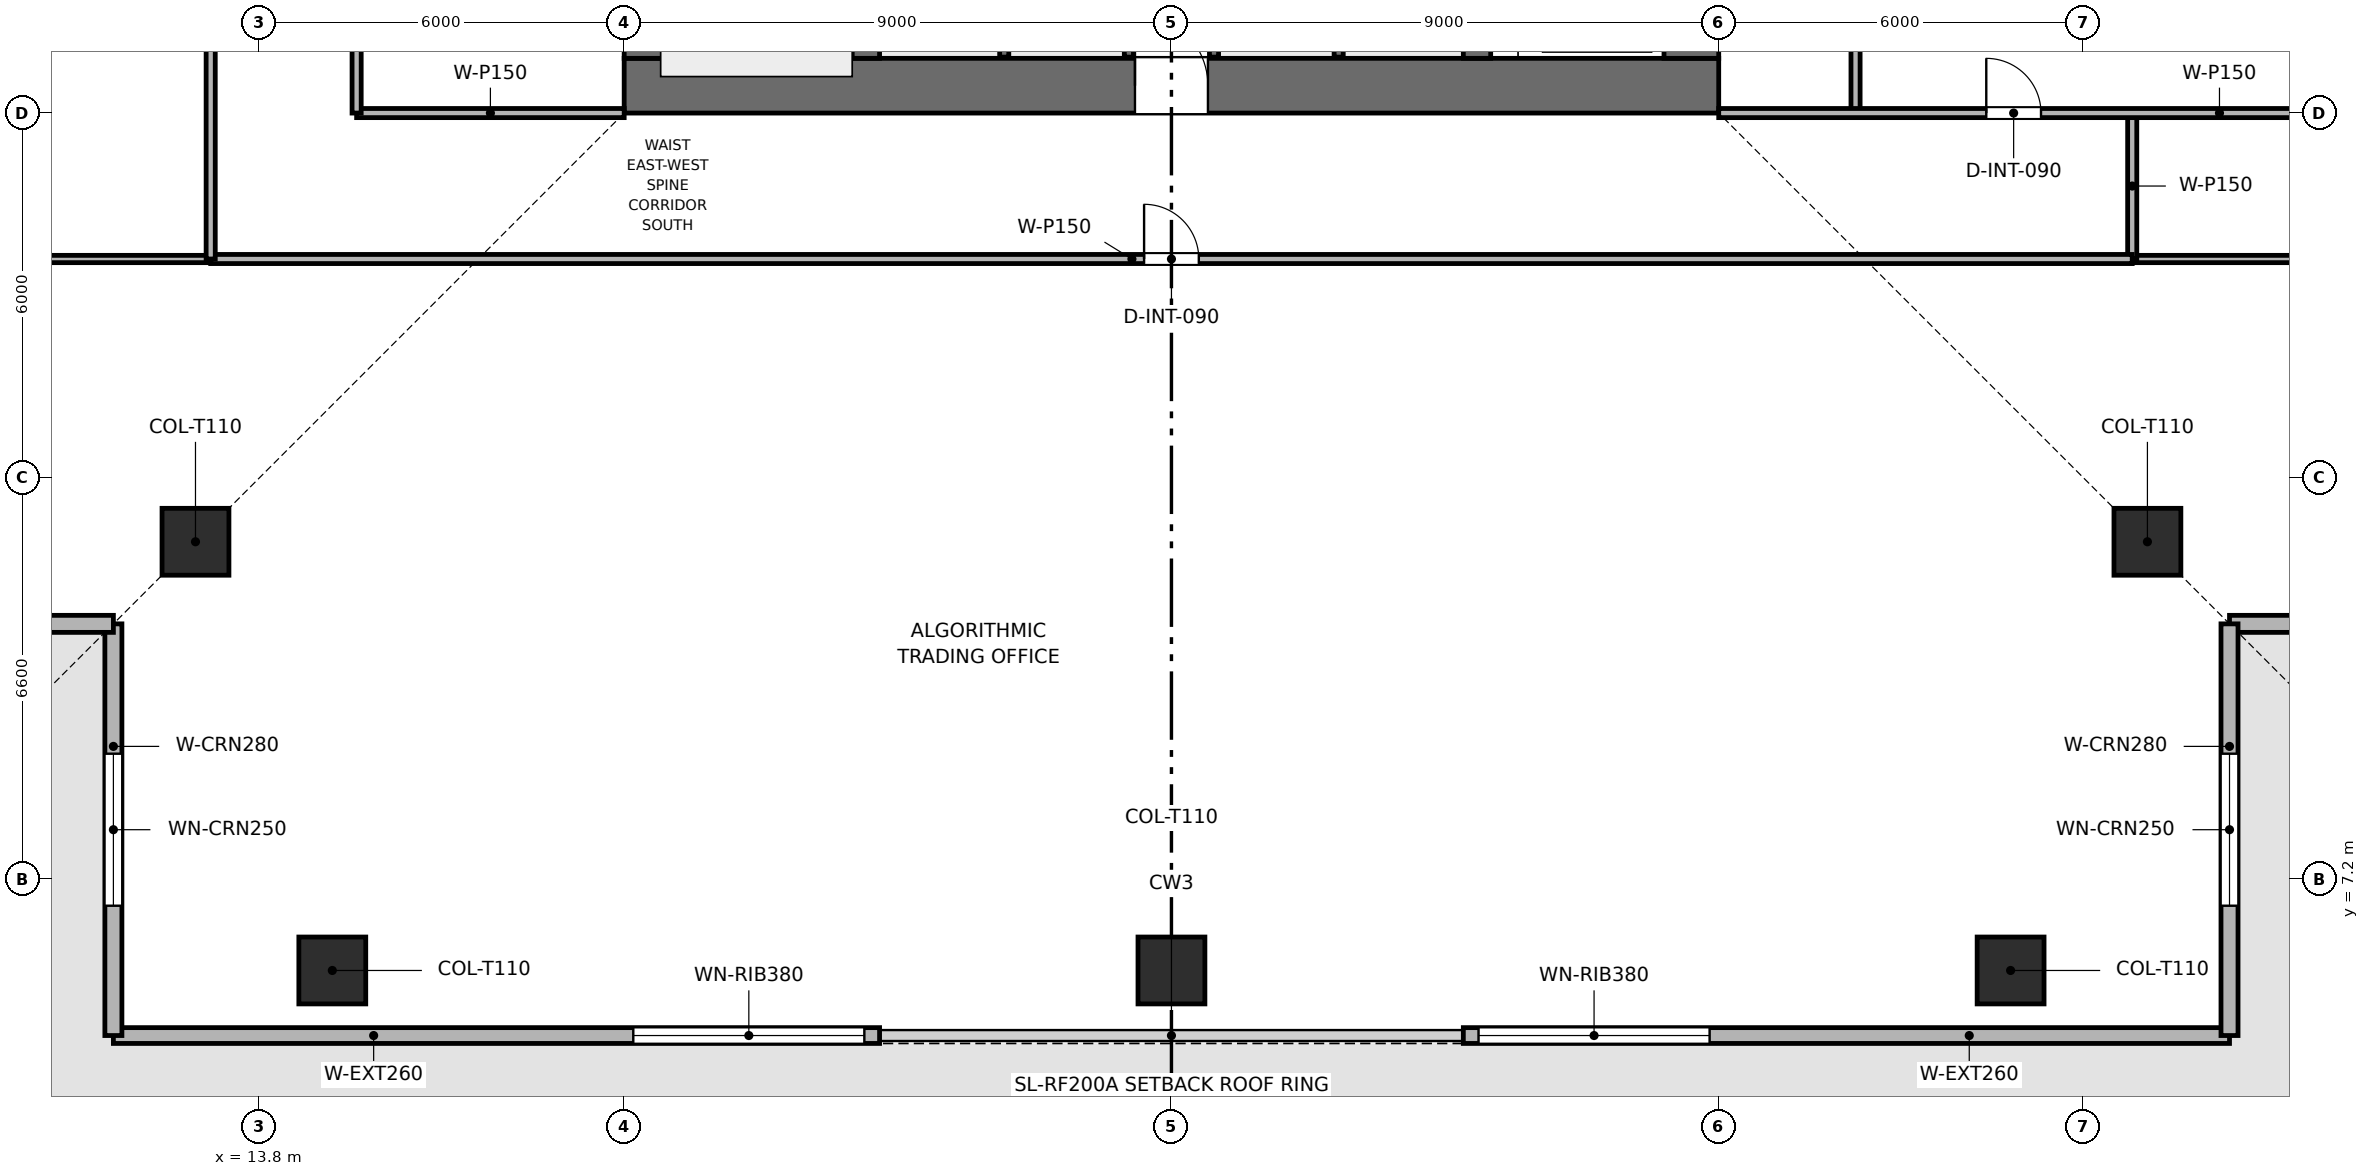
"""IFC4 building model, lengths in metres.
Left out: names, types, materials, properties, quantities, classifications, styles, units other than length and angle.
Written with IfcOpenShell. Run it as: python <this file> out.ifc"""

import sys

from ifc_helpers import new_model, si_unit, direction, frame, frame_2d, origin, origin_2d, place, context, subcontext, project, spatial, rectangle, extrude, element, fill, save


model = new_model("IFC4")
c1 = context("Model", 3, precision=1e-05, world=origin(), true_north=direction((0.0, 1.0)))
c2 = subcontext(c1, "Body", "Model", "MODEL_VIEW")
j1 = project(units=[si_unit("LENGTHUNIT", "METRE"), si_unit("PLANEANGLEUNIT", "RADIAN")], contexts=[c1])
p1 = place(None, origin())
s1 = spatial("IfcSite", under=j1, at=p1, CompositionType="ELEMENT")
p2 = place(p1, origin())
s2 = spatial("IfcBuilding", under=s1, at=p2, CompositionType="ELEMENT")
p3 = place(p2, frame((0.0, 0.0, 138.3)))
s3 = spatial("IfcBuildingStorey", under=s2, at=p3, CompositionType="ELEMENT", Elevation=138.3)
p4 = place(p3, frame((19.8, 20.25, 0.0), z_axis=(0.0, 0.0, 1.0), x_axis=(1.0, 0.0, 0.0)))
e1 = element("IfcWall", 1, at=p4, inside=s3, PredefinedType="SHEAR", context=c2, shape_type="SweptSolid", body=[
    extrude(rectangle(XDim=18.0, YDim=0.9, at=frame_2d((9.0, 0.0))), origin(), (0.0, 0.0, 1.0), 3.75),
])
p5 = place(p4, frame((8.4, 0.0, 0.0)))
e2 = element("IfcOpeningElement", 2, at=p5, cuts=e1, PredefinedType="OPENING", context=c2, shape_type="SweptSolid", body=[
    extrude(rectangle(XDim=1.2, YDim=2.2, at=frame_2d((0.6, 1.1))), frame((0.0, 0.46, 0.0), z_axis=(0.0, -1.0, 0.0), x_axis=(1.0, 0.0, 0.0)), (0.0, 0.0, 1.0), 0.92),
])
p6 = place(p3, frame((20.25, 20.7, 0.0), z_axis=(0.0, 0.0, 1.0), x_axis=(0.0, 1.0, 0.0)))
e3 = element("IfcWall", 3, at=p6, inside=s3, PredefinedType="SHEAR", context=c2, shape_type="SweptSolid", body=[
    extrude(rectangle(XDim=16.2, YDim=0.9, at=frame_2d((8.1, 0.0))), origin(), (0.0, 0.0, 1.0), 3.75),
])
p7 = place(p6, frame((10.1, 0.0, 0.0)))
e4 = element("IfcOpeningElement", 4, at=p7, cuts=e3, PredefinedType="OPENING", context=c2, shape_type="SweptSolid", body=[
    extrude(rectangle(XDim=1.1, YDim=2.15, at=frame_2d((0.55, 1.075))), frame((0.0, 0.46, 0.0), z_axis=(0.0, -1.0, 0.0), x_axis=(1.0, 0.0, 0.0)), (0.0, 0.0, 1.0), 0.92),
])
p8 = place(p3, frame((37.35, 20.7, 0.0), z_axis=(0.0, 0.0, 1.0), x_axis=(0.0, 1.0, 0.0)))
e5 = element("IfcWall", 5, at=p8, inside=s3, PredefinedType="SHEAR", context=c2, shape_type="SweptSolid", body=[
    extrude(rectangle(XDim=16.2, YDim=0.9, at=frame_2d((8.1, 0.0))), origin(), (0.0, 0.0, 1.0), 3.75),
])
p9 = place(p8, frame((4.6, 0.0, 0.0)))
e6 = element("IfcOpeningElement", 6, at=p9, cuts=e5, PredefinedType="OPENING", context=c2, shape_type="SweptSolid", body=[
    extrude(rectangle(XDim=1.1, YDim=2.15, at=frame_2d((0.55, 1.075))), frame((0.0, 0.46, 0.0), z_axis=(0.0, -1.0, 0.0), x_axis=(1.0, 0.0, 0.0)), (0.0, 0.0, 1.0), 0.92),
])
for number, where, z_axis, x_axis in (
    (7, (23.775, 20.7, 0.0), (0.0, 0.0, 1.0), (0.0, 1.0, 0.0)),
    (8, (33.825, 20.7, 0.0), (0.0, 0.0, 1.0), (0.0, 1.0, 0.0)),
):
    element("IfcWall", number, at=place(p3, frame(where, z_axis=z_axis, x_axis=x_axis)), inside=s3, PredefinedType="SHEAR", context=c2, shape_type="SweptSolid", body=[
        extrude(rectangle(XDim=16.2, YDim=0.45, at=frame_2d((8.1, 0.0))), origin(), (0.0, 0.0, 1.0), 3.75),
    ])
for number, where, z_axis, x_axis in (
    (9, (15.0, 5.7, 0.003), (0.0, 0.0, 1.0), (1.0, 0.0, 0.0)),
    (10, (28.8, 5.7, 0.003), (0.0, 0.0, 1.0), (1.0, 0.0, 0.0)),
    (11, (42.6, 5.7, 0.003), (0.0, 0.0, 1.0), (1.0, 0.0, 0.0)),
    (12, (12.75, 12.75, 0.003), (0.0, 0.0, 1.0), (1.0, 0.0, 0.0)),
    (13, (44.85, 12.75, 0.003), (0.0, 0.0, 1.0), (1.0, 0.0, 0.0)),
):
    element("IfcColumn", number, at=place(p3, frame(where, z_axis=z_axis, x_axis=x_axis)), inside=s3, PredefinedType="COLUMN", context=c2, shape_type="SweptSolid", body=[
        extrude(rectangle(XDim=1.1, YDim=1.1, at=origin_2d()), origin(), (0.0, 0.0, 1.0), 3.489),
    ])
p10 = place(p3, frame((46.2, 4.63, 0.0), z_axis=(0.0, 0.0, 1.0), x_axis=(-1.0, 0.0, 0.0)))
e14 = element("IfcWall", 14, at=p10, inside=s3, PredefinedType="SOLIDWALL", context=c2, shape_type="SweptSolid", body=[
    extrude(rectangle(XDim=12.6, YDim=0.26, at=frame_2d((6.3, 0.0))), origin(), (0.0, 0.0, 1.0), 3.495),
])
p11 = place(p10, frame((8.55, 0.0, 0.9)))
e15 = element("IfcOpeningElement", 15, at=p11, cuts=e14, PredefinedType="OPENING", context=c2, shape_type="SweptSolid", body=[
    extrude(rectangle(XDim=3.8, YDim=1.9, at=frame_2d((1.9, 0.95))), frame((0.0, 0.14, 0.0), z_axis=(0.0, -1.0, 0.0), x_axis=(1.0, 0.0, 0.0)), (0.0, 0.0, 1.0), 0.28),
])
p12 = place(p3, frame((24.0, 4.63, 0.0), z_axis=(0.0, 0.0, 1.0), x_axis=(-1.0, 0.0, 0.0)))
e16 = element("IfcWall", 16, at=p12, inside=s3, PredefinedType="SOLIDWALL", context=c2, shape_type="SweptSolid", body=[
    extrude(rectangle(XDim=12.6, YDim=0.26, at=frame_2d((6.3, 0.0))), origin(), (0.0, 0.0, 1.0), 3.495),
])
p13 = place(p12, frame((0.25, 0.0, 0.9)))
e17 = element("IfcOpeningElement", 17, at=p13, cuts=e16, PredefinedType="OPENING", context=c2, shape_type="SweptSolid", body=[
    extrude(rectangle(XDim=3.8, YDim=1.9, at=frame_2d((1.9, 0.95))), frame((0.0, 0.14, 0.0), z_axis=(0.0, -1.0, 0.0), x_axis=(1.0, 0.0, 0.0)), (0.0, 0.0, 1.0), 0.28),
])
p14 = place(p3, frame((11.4, 4.63, 0.0), z_axis=(0.0, 0.0, 1.0), x_axis=(0.0, 1.0, 0.0)))
e18 = element("IfcWall", 18, at=p14, inside=s3, PredefinedType="SOLIDWALL", context=c2, shape_type="SweptSolid", body=[
    extrude(rectangle(XDim=6.77, YDim=0.28, at=frame_2d((3.385, 0.0))), origin(), (0.0, 0.0, 1.0), 3.495),
])
p15 = place(p14, frame((2.135, 0.0, 0.9)))
e19 = element("IfcOpeningElement", 19, at=p15, cuts=e18, PredefinedType="OPENING", context=c2, shape_type="SweptSolid", body=[
    extrude(rectangle(XDim=2.5, YDim=1.9, at=frame_2d((1.25, 0.95))), frame((0.0, 0.15, 0.0), z_axis=(0.0, -1.0, 0.0), x_axis=(1.0, 0.0, 0.0)), (0.0, 0.0, 1.0), 0.3),
])
p16 = place(p3, frame((11.4, 11.4, 0.0), z_axis=(0.0, 0.0, 1.0), x_axis=(-1.0, 0.0, 0.0)))
e20 = element("IfcWall", 20, at=p16, inside=s3, PredefinedType="SOLIDWALL", context=c2, shape_type="SweptSolid", body=[
    extrude(rectangle(XDim=6.77, YDim=0.28, at=frame_2d((3.385, 0.0))), origin(), (0.0, 0.0, 1.0), 3.495),
])
p17 = place(p16, frame((2.135, 0.0, 0.9)))
e21 = element("IfcOpeningElement", 21, at=p17, cuts=e20, PredefinedType="OPENING", context=c2, shape_type="SweptSolid", body=[
    extrude(rectangle(XDim=2.5, YDim=1.9, at=frame_2d((1.25, 0.95))), frame((0.0, 0.15, 0.0), z_axis=(0.0, -1.0, 0.0), x_axis=(1.0, 0.0, 0.0)), (0.0, 0.0, 1.0), 0.3),
])
p18 = place(p3, frame((52.97, 11.4, 0.0), z_axis=(0.0, 0.0, 1.0), x_axis=(-1.0, 0.0, 0.0)))
e22 = element("IfcWall", 22, at=p18, inside=s3, PredefinedType="SOLIDWALL", context=c2, shape_type="SweptSolid", body=[
    extrude(rectangle(XDim=6.77, YDim=0.28, at=frame_2d((3.385, 0.0))), origin(), (0.0, 0.0, 1.0), 3.495),
])
p19 = place(p18, frame((2.135, 0.0, 0.9)))
e23 = element("IfcOpeningElement", 23, at=p19, cuts=e22, PredefinedType="OPENING", context=c2, shape_type="SweptSolid", body=[
    extrude(rectangle(XDim=2.5, YDim=1.9, at=frame_2d((1.25, 0.95))), frame((0.0, 0.15, 0.0), z_axis=(0.0, -1.0, 0.0), x_axis=(1.0, 0.0, 0.0)), (0.0, 0.0, 1.0), 0.3),
])
p20 = place(p3, frame((46.2, 11.4, 0.0), z_axis=(0.0, 0.0, 1.0), x_axis=(0.0, -1.0, 0.0)))
e24 = element("IfcWall", 24, at=p20, inside=s3, PredefinedType="SOLIDWALL", context=c2, shape_type="SweptSolid", body=[
    extrude(rectangle(XDim=6.77, YDim=0.28, at=frame_2d((3.385, 0.0))), origin(), (0.0, 0.0, 1.0), 3.495),
])
p21 = place(p20, frame((2.135, 0.0, 0.9)))
e25 = element("IfcOpeningElement", 25, at=p21, cuts=e24, PredefinedType="OPENING", context=c2, shape_type="SweptSolid", body=[
    extrude(rectangle(XDim=2.5, YDim=1.9, at=frame_2d((1.25, 0.95))), frame((0.0, 0.15, 0.0), z_axis=(0.0, -1.0, 0.0), x_axis=(1.0, 0.0, 0.0)), (0.0, 0.0, 1.0), 0.3),
])
for number, where, z_axis, x_axis in (
    (26, (26.05, 20.72, 0.0), (0.0, 0.0, 1.0), (0.0, 1.0, 0.0)),
    (27, (28.1, 20.72, 0.0), (0.0, 0.0, 1.0), (0.0, 1.0, 0.0)),
    (28, (29.5, 20.72, 0.0), (0.0, 0.0, 1.0), (0.0, 1.0, 0.0)),
    (29, (31.55, 20.72, 0.0), (0.0, 0.0, 1.0), (0.0, 1.0, 0.0)),
):
    element("IfcWall", number, at=place(p3, frame(where, z_axis=z_axis, x_axis=x_axis)), inside=s3, PredefinedType="SHEAR", context=c2, shape_type="SweptSolid", body=[
        extrude(rectangle(XDim=2.26, YDim=0.15, at=frame_2d((1.13, 0.0))), origin(), (0.0, 0.0, 1.0), 3.495),
    ])
p22 = place(p3, frame((15.4, 19.8, 0.0), z_axis=(0.0, 0.0, 1.0), x_axis=(1.0, 0.0, 0.0)))
e30 = element("IfcWall", 30, at=p22, inside=s3, PredefinedType="PARTITIONING", context=c2, shape_type="SweptSolid", body=[
    extrude(rectangle(XDim=4.4, YDim=0.15, at=frame_2d((2.2, 0.0))), origin(), (0.0, 0.0, 1.0), 3.03),
])
p23 = place(p3, frame((15.4, 19.8, 0.0), z_axis=(0.0, 0.0, 1.0), x_axis=(0.0, 1.0, 0.0)))
e31 = element("IfcWall", 31, at=p23, inside=s3, PredefinedType="PARTITIONING", context=c2, shape_type="SweptSolid", body=[
    extrude(rectangle(XDim=10.35, YDim=0.15, at=frame_2d((5.175, 0.0))), origin(), (0.0, 0.0, 1.0), 3.03),
])
p24 = place(p23, frame((1.2, 0.0, 0.0)))
e32 = element("IfcOpeningElement", 32, at=p24, cuts=e31, PredefinedType="OPENING", context=c2, shape_type="SweptSolid", body=[
    extrude(rectangle(XDim=0.9, YDim=2.1, at=frame_2d((0.45, 1.05))), frame((0.0, 0.085, 0.0), z_axis=(0.0, -1.0, 0.0), x_axis=(1.0, 0.0, 0.0)), (0.0, 0.0, 1.0), 0.17),
])
p25 = place(p23, frame((4.7, 0.0, 0.0)))
e33 = element("IfcOpeningElement", 33, at=p25, cuts=e31, PredefinedType="OPENING", context=c2, shape_type="SweptSolid", body=[
    extrude(rectangle(XDim=0.9, YDim=2.1, at=frame_2d((0.45, 1.05))), frame((0.0, 0.085, 0.0), z_axis=(0.0, -1.0, 0.0), x_axis=(1.0, 0.0, 0.0)), (0.0, 0.0, 1.0), 0.17),
])
p26 = place(p23, frame((8.1, 0.0, 0.0)))
e34 = element("IfcOpeningElement", 34, at=p26, cuts=e31, PredefinedType="OPENING", context=c2, shape_type="SweptSolid", body=[
    extrude(rectangle(XDim=0.95, YDim=2.1, at=frame_2d((0.475, 1.05))), frame((0.0, 0.085, 0.0), z_axis=(0.0, -1.0, 0.0), x_axis=(1.0, 0.0, 0.0)), (0.0, 0.0, 1.0), 0.17),
])
p27 = place(p3, frame((40.05, 19.8, 0.0), z_axis=(0.0, 0.0, 1.0), x_axis=(0.0, 1.0, 0.0)))
e35 = element("IfcWall", 35, at=p27, inside=s3, PredefinedType="PARTITIONING", context=c2, shape_type="SweptSolid", body=[
    extrude(rectangle(XDim=7.05, YDim=0.15, at=frame_2d((3.525, 0.0))), origin(), (0.0, 0.0, 1.0), 3.03),
])
p28 = place(p3, frame((4.63, 17.4, 0.0), z_axis=(0.0, 0.0, 1.0), x_axis=(1.0, 0.0, 0.0)))
e36 = element("IfcWall", 36, at=p28, inside=s3, PredefinedType="PARTITIONING", context=c2, shape_type="SweptSolid", body=[
    extrude(rectangle(XDim=8.37, YDim=0.12, at=frame_2d((4.185, 0.0))), origin(), (0.0, 0.0, 1.0), 2.98),
])
p29 = place(p3, frame((44.6, 17.4, 0.0), z_axis=(0.0, 0.0, 1.0), x_axis=(1.0, 0.0, 0.0)))
e37 = element("IfcWall", 37, at=p29, inside=s3, PredefinedType="PARTITIONING", context=c2, shape_type="SweptSolid", body=[
    extrude(rectangle(XDim=8.37, YDim=0.12, at=frame_2d((4.185, 0.0))), origin(), (0.0, 0.0, 1.0), 2.98),
])
p30 = place(p3, frame((44.6, 17.4, 0.0), z_axis=(0.0, 0.0, 1.0), x_axis=(0.0, 1.0, 0.0)))
e38 = element("IfcWall", 38, at=p30, inside=s3, PredefinedType="PARTITIONING", context=c2, shape_type="SweptSolid", body=[
    extrude(rectangle(XDim=2.4, YDim=0.15, at=frame_2d((1.2, 0.0))), origin(), (0.0, 0.0, 1.0), 3.495),
])
p31 = place(p3, frame((37.8, 19.8, 0.0), z_axis=(0.0, 0.0, 1.0), x_axis=(1.0, 0.0, 0.0)))
e39 = element("IfcWall", 39, at=p31, inside=s3, PredefinedType="PARTITIONING", context=c2, shape_type="SweptSolid", body=[
    extrude(rectangle(XDim=15.17, YDim=0.15, at=frame_2d((7.585, 0.0))), origin(), (0.0, 0.0, 1.0), 2.98),
])
p32 = place(p31, frame((4.4, 0.0, 0.0)))
e40 = element("IfcOpeningElement", 40, at=p32, cuts=e39, PredefinedType="OPENING", context=c2, shape_type="SweptSolid", body=[
    extrude(rectangle(XDim=0.9, YDim=2.1, at=frame_2d((0.45, 1.05))), frame((0.0, 0.085, 0.0), z_axis=(0.0, -1.0, 0.0), x_axis=(1.0, 0.0, 0.0)), (0.0, 0.0, 1.0), 0.17),
])
p33 = place(p3, frame((13.0, 17.4, 0.0), z_axis=(0.0, 0.0, 1.0), x_axis=(1.0, 0.0, 0.0)))
e41 = element("IfcWall", 41, at=p33, inside=s3, PredefinedType="PARTITIONING", context=c2, shape_type="SweptSolid", body=[
    extrude(rectangle(XDim=31.6, YDim=0.15, at=frame_2d((15.8, 0.0))), origin(), (0.0, 0.0, 1.0), 3.03),
])
p34 = place(p33, frame((15.35, 0.0, 0.0)))
e42 = element("IfcOpeningElement", 42, at=p34, cuts=e41, PredefinedType="OPENING", context=c2, shape_type="SweptSolid", body=[
    extrude(rectangle(XDim=0.9, YDim=2.1, at=frame_2d((0.45, 1.05))), frame((0.0, 0.085, 0.0), z_axis=(0.0, -1.0, 0.0), x_axis=(1.0, 0.0, 0.0)), (0.0, 0.0, 1.0), 0.17),
])
p35 = place(p3, frame((13.0, 17.4, 0.0), z_axis=(0.0, 0.0, 1.0), x_axis=(0.0, 1.0, 0.0)))
e43 = element("IfcWall", 43, at=p35, inside=s3, PredefinedType="PARTITIONING", context=c2, shape_type="SweptSolid", body=[
    extrude(rectangle(XDim=22.8, YDim=0.15, at=frame_2d((11.4, 0.0))), origin(), (0.0, 0.0, 1.0), 3.03),
])
p36 = place(p35, frame((10.95, 0.0, 0.0)))
e44 = element("IfcOpeningElement", 44, at=p36, cuts=e43, PredefinedType="OPENING", context=c2, shape_type="SweptSolid", body=[
    extrude(rectangle(XDim=0.9, YDim=2.1, at=frame_2d((0.45, 1.05))), frame((0.0, 0.085, 0.0), z_axis=(0.0, -1.0, 0.0), x_axis=(1.0, 0.0, 0.0)), (0.0, 0.0, 1.0), 0.17),
])
p37 = place(p11, origin())
e45 = element("IfcWindow", 45, at=p37, inside=s3, PartitioningType="SINGLE_PANEL", PredefinedType="WINDOW", context=c2, shape_type="SweptSolid", body=[
    extrude(rectangle(XDim=3.8, YDim=1.9, at=frame_2d((1.9, 0.95))), frame((0.0, 0.03, 0.0), z_axis=(0.0, -1.0, 0.0), x_axis=(1.0, 0.0, 0.0)), (0.0, 0.0, 1.0), 0.06),
])
fill(e15, e45)
p38 = place(p13, origin())
e46 = element("IfcWindow", 46, at=p38, inside=s3, PartitioningType="SINGLE_PANEL", PredefinedType="WINDOW", context=c2, shape_type="SweptSolid", body=[
    extrude(rectangle(XDim=3.8, YDim=1.9, at=frame_2d((1.9, 0.95))), frame((0.0, 0.03, 0.0), z_axis=(0.0, -1.0, 0.0), x_axis=(1.0, 0.0, 0.0)), (0.0, 0.0, 1.0), 0.06),
])
fill(e17, e46)
p39 = place(p15, origin())
e47 = element("IfcWindow", 47, at=p39, inside=s3, PartitioningType="SINGLE_PANEL", PredefinedType="WINDOW", context=c2, shape_type="SweptSolid", body=[
    extrude(rectangle(XDim=2.5, YDim=1.9, at=frame_2d((1.25, 0.95))), frame((0.0, 0.03, 0.0), z_axis=(0.0, -1.0, 0.0), x_axis=(1.0, 0.0, 0.0)), (0.0, 0.0, 1.0), 0.06),
])
fill(e19, e47)
p40 = place(p21, origin())
e48 = element("IfcWindow", 48, at=p40, inside=s3, PartitioningType="SINGLE_PANEL", PredefinedType="WINDOW", context=c2, shape_type="SweptSolid", body=[
    extrude(rectangle(XDim=2.5, YDim=1.9, at=frame_2d((1.25, 0.95))), frame((0.0, 0.03, 0.0), z_axis=(0.0, -1.0, 0.0), x_axis=(1.0, 0.0, 0.0)), (0.0, 0.0, 1.0), 0.06),
])
fill(e25, e48)
p41 = place(p32, origin())
e49 = element("IfcDoor", 49, at=p41, inside=s3, OperationType="SINGLE_SWING_LEFT", PredefinedType="DOOR", context=c2, shape_type="SweptSolid", body=[
    extrude(rectangle(XDim=0.9, YDim=2.1, at=frame_2d((0.45, 1.05))), frame((0.0, 0.025, 0.0), z_axis=(0.0, -1.0, 0.0), x_axis=(1.0, 0.0, 0.0)), (0.0, 0.0, 1.0), 0.05),
])
fill(e40, e49)
p42 = place(p34, origin())
e50 = element("IfcDoor", 50, at=p42, inside=s3, OperationType="SINGLE_SWING_LEFT", PredefinedType="DOOR", context=c2, shape_type="SweptSolid", body=[
    extrude(rectangle(XDim=0.9, YDim=2.1, at=frame_2d((0.45, 1.05))), frame((0.0, 0.025, 0.0), z_axis=(0.0, -1.0, 0.0), x_axis=(1.0, 0.0, 0.0)), (0.0, 0.0, 1.0), 0.05),
])
fill(e42, e50)
p43 = place(p5, origin())
e51 = element("IfcDoor", 51, at=p43, inside=s3, OperationType="SINGLE_SWING_LEFT", PredefinedType="DOOR", context=c2, shape_type="SweptSolid", body=[
    extrude(rectangle(XDim=1.2, YDim=2.2, at=frame_2d((0.6, 1.1))), frame((0.0, 0.025, 0.0), z_axis=(0.0, -1.0, 0.0), x_axis=(1.0, 0.0, 0.0)), (0.0, 0.0, 1.0), 0.05),
])
fill(e2, e51)
save(model, sys.argv[1])
